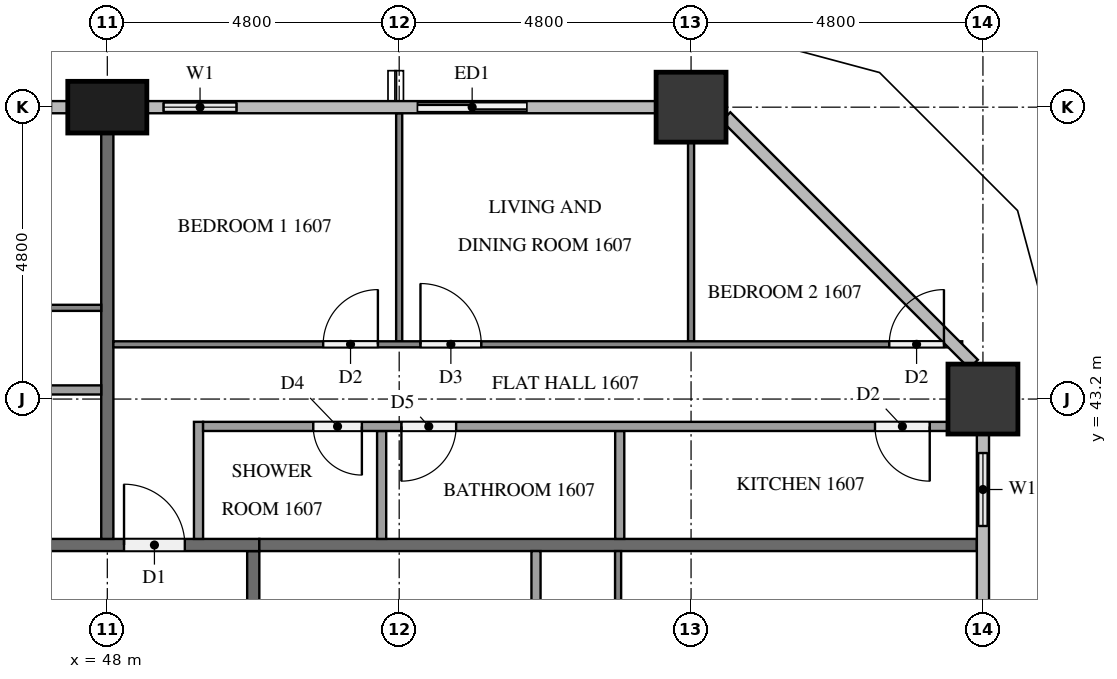
"""IFC4 building model, lengths in metres.
Left out: names, types, materials, properties, quantities, classifications, styles, units other than length and angle.
Written with IfcOpenShell. Run it as: python <this file> out.ifc"""

import sys

from ifc_helpers import new_model, si_unit, direction, frame, frame_2d, origin, origin_2d, place, context, subcontext, project, spatial, rectangle, extrude, element, fill, save


model = new_model("IFC4")
c1 = context("Model", 3, precision=1e-05, world=origin(), true_north=direction((0.0, 1.0)))
c2 = subcontext(c1, "Body", "Model", "MODEL_VIEW")
j1 = project(units=[si_unit("LENGTHUNIT", "METRE"), si_unit("PLANEANGLEUNIT", "RADIAN")], contexts=[c1])
p1 = place(None, origin())
s1 = spatial("IfcSite", under=j1, at=p1, CompositionType="ELEMENT")
p2 = place(p1, origin())
s2 = spatial("IfcBuilding", under=s1, at=p2, CompositionType="ELEMENT")
p3 = place(p2, frame((0.0, 0.0, 66.3)))
s3 = spatial("IfcBuildingStorey", under=s2, at=p3, CompositionType="ELEMENT", Elevation=66.3)
for number, where, z_axis, x_axis in (
    (1, (62.4, 43.2, 0.0), (0.0, 0.0, 1.0), (1.0, 0.0, 0.0)),
    (2, (57.6, 48.0, 0.0), (0.0, 0.0, 1.0), (1.0, 0.0, 0.0)),
):
    element("IfcColumn", number, at=place(p3, frame(where, z_axis=z_axis, x_axis=x_axis)), inside=s3, PredefinedType="COLUMN", context=c2, shape_type="SweptSolid", body=[
        extrude(rectangle(XDim=1.15, YDim=1.15, at=origin_2d()), origin(), (0.0, 0.0, 1.0), 3.2),
    ])
p4 = place(p3, frame((48.0, 48.0, 0.0), z_axis=(0.0, 0.0, 1.0), x_axis=(1.0, 0.0, 0.0)))
e3 = element("IfcColumn", 3, at=p4, inside=s3, PredefinedType="COLUMN", context=c2, shape_type="SweptSolid", body=[
    extrude(rectangle(XDim=1.3, YDim=0.85, at=origin_2d()), origin(), (0.0, 0.0, 1.0), 3.2),
])
p5 = place(p3, frame((62.4, 40.8, 0.0), z_axis=(0.0, 0.0, 1.0), x_axis=(0.0, 1.0, 0.0)))
e4 = element("IfcWall", 4, at=p5, inside=s3, PredefinedType="SOLIDWALL", context=c2, shape_type="SweptSolid", body=[
    extrude(rectangle(XDim=1.825, YDim=0.15, at=frame_2d((0.913, 0.0))), origin(), (0.0, 0.0, 1.0), 3.2),
])
p6 = place(p5, frame((0.312, 0.0, 0.9)))
e5 = element("IfcOpeningElement", 5, at=p6, cuts=e4, PredefinedType="OPENING", context=c2, shape_type="SweptSolid", body=[
    extrude(rectangle(XDim=1.2, YDim=1.4, at=frame_2d((0.6, 0.7))), frame((0.0, 0.085, 0.0), z_axis=(0.0, -1.0, 0.0), x_axis=(1.0, 0.0, 0.0)), (0.0, 0.0, 1.0), 0.17),
])
p7 = place(p3, frame((55.2, 48.0, 0.0), z_axis=(0.0, 0.0, 1.0), x_axis=(-1.0, 0.0, 0.0)))
e6 = element("IfcWall", 6, at=p7, inside=s3, PredefinedType="SOLIDWALL", context=c2, shape_type="SweptSolid", body=[
    extrude(rectangle(XDim=2.4, YDim=0.15, at=frame_2d((1.2, 0.0))), origin(), (0.0, 0.0, 1.0), 3.2),
])
p8 = place(p7, frame((0.3, 0.0, 0.0)))
e7 = element("IfcOpeningElement", 7, at=p8, cuts=e6, PredefinedType="OPENING", context=c2, shape_type="SweptSolid", body=[
    extrude(rectangle(XDim=1.8, YDim=2.4, at=frame_2d((0.9, 1.2))), frame((0.0, 0.085, 0.0), z_axis=(0.0, -1.0, 0.0), x_axis=(1.0, 0.0, 0.0)), (0.0, 0.0, 1.0), 0.17),
])
p9 = place(p3, frame((50.4, 48.0, 0.0), z_axis=(0.0, 0.0, 1.0), x_axis=(-1.0, 0.0, 0.0)))
e8 = element("IfcWall", 8, at=p9, inside=s3, PredefinedType="SOLIDWALL", context=c2, shape_type="SweptSolid", body=[
    extrude(rectangle(XDim=1.75, YDim=0.15, at=frame_2d((0.875, 0.0))), origin(), (0.0, 0.0, 1.0), 3.2),
])
p10 = place(p9, frame((0.275, 0.0, 0.9)))
e9 = element("IfcOpeningElement", 9, at=p10, cuts=e8, PredefinedType="OPENING", context=c2, shape_type="SweptSolid", body=[
    extrude(rectangle(XDim=1.2, YDim=1.4, at=frame_2d((0.6, 0.7))), frame((0.0, 0.085, 0.0), z_axis=(0.0, -1.0, 0.0), x_axis=(1.0, 0.0, 0.0)), (0.0, 0.0, 1.0), 0.17),
])
p11 = place(p3, frame((47.35, 48.0, 0.0), z_axis=(0.0, 0.0, 1.0), x_axis=(-1.0, 0.0, 0.0)))
e10 = element("IfcWall", 10, at=p11, inside=s3, PredefinedType="SOLIDWALL", context=c2, shape_type="SweptSolid", body=[
    extrude(rectangle(XDim=1.75, YDim=0.15, at=frame_2d((0.875, 0.0))), origin(), (0.0, 0.0, 1.0), 3.2),
])
p12 = place(p11, frame((0.275, 0.0, 0.9)))
e11 = element("IfcOpeningElement", 11, at=p12, cuts=e10, PredefinedType="OPENING", context=c2, shape_type="SweptSolid", body=[
    extrude(rectangle(XDim=1.2, YDim=1.4, at=frame_2d((0.6, 0.7))), frame((0.0, 0.085, 0.0), z_axis=(0.0, -1.0, 0.0), x_axis=(1.0, 0.0, 0.0)), (0.0, 0.0, 1.0), 0.17),
])
p13 = place(p3, frame((50.4, 40.7, 0.0), z_axis=(0.0, 0.0, 1.0), x_axis=(0.0, -1.0, 0.0)))
e12 = element("IfcWall", 12, at=p13, inside=s3, PredefinedType="PARTITIONING", context=c2, shape_type="SweptSolid", body=[
    extrude(rectangle(XDim=28.6, YDim=0.2, at=frame_2d((14.3, 0.0))), origin(), (0.0, 0.0, 1.0), 3.2),
])
p14 = place(p13, frame((24.175, 0.0, 0.0)))
e13 = element("IfcOpeningElement", 13, at=p14, cuts=e12, PredefinedType="OPENING", context=c2, shape_type="SweptSolid", body=[
    extrude(rectangle(XDim=1.0, YDim=2.1, at=frame_2d((0.5, 1.05))), frame((0.0, 0.11, 0.0), z_axis=(0.0, -1.0, 0.0), x_axis=(1.0, 0.0, 0.0)), (0.0, 0.0, 1.0), 0.22),
])
p15 = place(p13, frame((22.625, 0.0, 0.0)))
e14 = element("IfcOpeningElement", 14, at=p15, cuts=e12, PredefinedType="OPENING", context=c2, shape_type="SweptSolid", body=[
    extrude(rectangle(XDim=1.0, YDim=2.1, at=frame_2d((0.5, 1.05))), frame((0.0, 0.11, 0.0), z_axis=(0.0, -1.0, 0.0), x_axis=(1.0, 0.0, 0.0)), (0.0, 0.0, 1.0), 0.22),
])
p16 = place(p13, frame((10.625, 0.0, 0.0)))
e15 = element("IfcOpeningElement", 15, at=p16, cuts=e12, PredefinedType="OPENING", context=c2, shape_type="SweptSolid", body=[
    extrude(rectangle(XDim=1.0, YDim=2.1, at=frame_2d((0.5, 1.05))), frame((0.0, 0.11, 0.0), z_axis=(0.0, -1.0, 0.0), x_axis=(1.0, 0.0, 0.0)), (0.0, 0.0, 1.0), 0.22),
])
p17 = place(p3, frame((11.9, 40.8, 0.0), z_axis=(0.0, 0.0, 1.0), x_axis=(1.0, 0.0, 0.0)))
e16 = element("IfcWall", 16, at=p17, inside=s3, PredefinedType="PARTITIONING", context=c2, shape_type="SweptSolid", body=[
    extrude(rectangle(XDim=38.6, YDim=0.2, at=frame_2d((19.3, 0.0))), origin(), (0.0, 0.0, 1.0), 3.2),
])
p18 = place(p17, frame((36.375, 0.0, 0.0)))
e17 = element("IfcOpeningElement", 17, at=p18, cuts=e16, PredefinedType="OPENING", context=c2, shape_type="SweptSolid", body=[
    extrude(rectangle(XDim=1.0, YDim=2.1, at=frame_2d((0.5, 1.05))), frame((0.0, 0.11, 0.0), z_axis=(0.0, -1.0, 0.0), x_axis=(1.0, 0.0, 0.0)), (0.0, 0.0, 1.0), 0.22),
])
p19 = place(p17, frame((17.125, 0.0, 0.0)))
e18 = element("IfcOpeningElement", 18, at=p19, cuts=e16, PredefinedType="OPENING", context=c2, shape_type="SweptSolid", body=[
    extrude(rectangle(XDim=1.1, YDim=2.1, at=frame_2d((0.55, 1.05))), frame((0.0, 0.11, 0.0), z_axis=(0.0, -1.0, 0.0), x_axis=(1.0, 0.0, 0.0)), (0.0, 0.0, 1.0), 0.22),
])
p20 = place(p17, frame((15.625, 0.0, 0.0)))
e19 = element("IfcOpeningElement", 19, at=p20, cuts=e16, PredefinedType="OPENING", context=c2, shape_type="SweptSolid", body=[
    extrude(rectangle(XDim=1.0, YDim=2.1, at=frame_2d((0.5, 1.05))), frame((0.0, 0.11, 0.0), z_axis=(0.0, -1.0, 0.0), x_axis=(1.0, 0.0, 0.0)), (0.0, 0.0, 1.0), 0.22),
])
p21 = place(p17, frame((1.225, 0.0, 0.0)))
e20 = element("IfcOpeningElement", 20, at=p21, cuts=e16, PredefinedType="OPENING", context=c2, shape_type="SweptSolid", body=[
    extrude(rectangle(XDim=1.0, YDim=2.1, at=frame_2d((0.5, 1.05))), frame((0.0, 0.11, 0.0), z_axis=(0.0, -1.0, 0.0), x_axis=(1.0, 0.0, 0.0)), (0.0, 0.0, 1.0), 0.22),
])
p22 = place(p3, frame((50.5, 40.8, 0.0), z_axis=(0.0, 0.0, 1.0), x_axis=(1.0, 0.0, 0.0)))
e21 = element("IfcWall", 21, at=p22, inside=s3, PredefinedType="PARTITIONING", context=c2, shape_type="SweptSolid", body=[
    extrude(rectangle(XDim=11.8, YDim=0.2, at=frame_2d((5.9, 0.0))), origin(), (0.0, 0.0, 1.0), 3.2),
])
p23 = place(p3, frame((48.0, 47.575, 0.0), z_axis=(0.0, 0.0, 1.0), x_axis=(0.0, -1.0, 0.0)))
e22 = element("IfcWall", 22, at=p23, inside=s3, PredefinedType="PARTITIONING", context=c2, shape_type="SweptSolid", body=[
    extrude(rectangle(XDim=6.675, YDim=0.2, at=frame_2d((3.337, 0.0))), origin(), (0.0, 0.0, 1.0), 3.2),
])
p24 = place(p3, frame((56.4, 40.7, 0.0), z_axis=(0.0, 0.0, 1.0), x_axis=(0.0, -1.0, 0.0)))
e23 = element("IfcWall", 23, at=p24, inside=s3, PredefinedType="PARTITIONING", context=c2, shape_type="SweptSolid", body=[
    extrude(rectangle(XDim=11.8, YDim=0.1, at=frame_2d((5.9, 0.0))), origin(), (0.0, 0.0, 1.0), 3.2),
])
p25 = place(p24, frame((5.05, 0.0, 0.0)))
e24 = element("IfcOpeningElement", 24, at=p25, cuts=e23, PredefinedType="OPENING", context=c2, shape_type="SweptSolid", body=[
    extrude(rectangle(XDim=1.0, YDim=2.1, at=frame_2d((0.5, 1.05))), frame((0.0, 0.06, 0.0), z_axis=(0.0, -1.0, 0.0), x_axis=(1.0, 0.0, 0.0)), (0.0, 0.0, 1.0), 0.12),
])
p26 = place(p24, frame((3.45, 0.0, 0.0)))
e25 = element("IfcOpeningElement", 25, at=p26, cuts=e23, PredefinedType="OPENING", context=c2, shape_type="SweptSolid", body=[
    extrude(rectangle(XDim=0.9, YDim=2.1, at=frame_2d((0.45, 1.05))), frame((0.0, 0.06, 0.0), z_axis=(0.0, -1.0, 0.0), x_axis=(1.0, 0.0, 0.0)), (0.0, 0.0, 1.0), 0.12),
])
p27 = place(p3, frame((55.05, 30.375, 0.0), z_axis=(0.0, 0.0, 1.0), x_axis=(0.0, 1.0, 0.0)))
e26 = element("IfcWall", 26, at=p27, inside=s3, PredefinedType="PARTITIONING", context=c2, shape_type="SweptSolid", body=[
    extrude(rectangle(XDim=10.325, YDim=0.15, at=frame_2d((5.163, 0.0))), origin(), (0.0, 0.0, 1.0), 3.2),
])
p28 = place(p27, frame((3.005, 0.0, 0.0)))
e27 = element("IfcOpeningElement", 27, at=p28, cuts=e26, PredefinedType="OPENING", context=c2, shape_type="SweptSolid", body=[
    extrude(rectangle(XDim=0.8, YDim=2.1, at=frame_2d((0.4, 1.05))), frame((0.0, 0.085, 0.0), z_axis=(0.0, -1.0, 0.0), x_axis=(1.0, 0.0, 0.0)), (0.0, 0.0, 1.0), 0.17),
])
p29 = place(p27, frame((4.455, 0.0, 0.0)))
e28 = element("IfcOpeningElement", 28, at=p29, cuts=e26, PredefinedType="OPENING", context=c2, shape_type="SweptSolid", body=[
    extrude(rectangle(XDim=0.9, YDim=2.1, at=frame_2d((0.45, 1.05))), frame((0.0, 0.085, 0.0), z_axis=(0.0, -1.0, 0.0), x_axis=(1.0, 0.0, 0.0)), (0.0, 0.0, 1.0), 0.17),
])
p30 = place(p3, frame((52.8, 44.15, 0.0), z_axis=(0.0, 0.0, 1.0), x_axis=(0.0, 1.0, 0.0)))
e29 = element("IfcWall", 29, at=p30, inside=s3, PredefinedType="PARTITIONING", context=c2, shape_type="SweptSolid", body=[
    extrude(rectangle(XDim=3.75, YDim=0.1, at=frame_2d((1.875, 0.0))), origin(), (0.0, 0.0, 1.0), 3.2),
])
p31 = place(p3, frame((57.6, 44.15, 0.0), z_axis=(0.0, 0.0, 1.0), x_axis=(0.0, 1.0, 0.0)))
e30 = element("IfcWall", 30, at=p31, inside=s3, PredefinedType="PARTITIONING", context=c2, shape_type="SweptSolid", body=[
    extrude(rectangle(XDim=3.275, YDim=0.1, at=frame_2d((1.638, 0.0))), origin(), (0.0, 0.0, 1.0), 3.2),
])
p32 = place(p3, frame((48.1, 44.1, 0.0), z_axis=(0.0, 0.0, 1.0), x_axis=(1.0, 0.0, 0.0)))
e31 = element("IfcWall", 31, at=p32, inside=s3, PredefinedType="PARTITIONING", context=c2, shape_type="SweptSolid", body=[
    extrude(rectangle(XDim=13.959, YDim=0.1, at=frame_2d((6.979, 0.0))), origin(), (0.0, 0.0, 1.0), 3.2),
])
p33 = place(p32, frame((3.45, 0.0, 0.0)))
e32 = element("IfcOpeningElement", 32, at=p33, cuts=e31, PredefinedType="OPENING", context=c2, shape_type="SweptSolid", body=[
    extrude(rectangle(XDim=0.9, YDim=2.1, at=frame_2d((0.45, 1.05))), frame((0.0, 0.06, 0.0), z_axis=(0.0, -1.0, 0.0), x_axis=(1.0, 0.0, 0.0)), (0.0, 0.0, 1.0), 0.12),
])
p34 = place(p32, frame((5.05, 0.0, 0.0)))
e33 = element("IfcOpeningElement", 33, at=p34, cuts=e31, PredefinedType="OPENING", context=c2, shape_type="SweptSolid", body=[
    extrude(rectangle(XDim=1.0, YDim=2.1, at=frame_2d((0.5, 1.05))), frame((0.0, 0.06, 0.0), z_axis=(0.0, -1.0, 0.0), x_axis=(1.0, 0.0, 0.0)), (0.0, 0.0, 1.0), 0.12),
])
p35 = place(p32, frame((12.759, 0.0, 0.0)))
e34 = element("IfcOpeningElement", 34, at=p35, cuts=e31, PredefinedType="OPENING", context=c2, shape_type="SweptSolid", body=[
    extrude(rectangle(XDim=0.9, YDim=2.1, at=frame_2d((0.45, 1.05))), frame((0.0, 0.06, 0.0), z_axis=(0.0, -1.0, 0.0), x_axis=(1.0, 0.0, 0.0)), (0.0, 0.0, 1.0), 0.12),
])
for number, where, z_axis, x_axis in (
    (35, (52.511, 40.9, 0.0), (0.0, 0.0, 1.0), (0.0, 1.0, 0.0)),
    (36, (56.427, 40.9, 0.0), (0.0, 0.0, 1.0), (0.0, 1.0, 0.0)),
):
    element("IfcWall", number, at=place(p3, frame(where, z_axis=z_axis, x_axis=x_axis)), inside=s3, PredefinedType="PARTITIONING", context=c2, shape_type="SweptSolid", body=[
        extrude(rectangle(XDim=1.775, YDim=0.15, at=frame_2d((0.888, 0.0))), origin(), (0.0, 0.0, 1.0), 3.2),
    ])
p36 = place(p3, frame((49.5, 40.9, 0.0), z_axis=(0.0, 0.0, 1.0), x_axis=(0.0, 1.0, 0.0)))
e37 = element("IfcWall", 37, at=p36, inside=s3, PredefinedType="PARTITIONING", context=c2, shape_type="SweptSolid", body=[
    extrude(rectangle(XDim=1.925, YDim=0.15, at=frame_2d((0.962, 0.0))), origin(), (0.0, 0.0, 1.0), 3.2),
])
p37 = place(p3, frame((61.825, 42.75, 0.0), z_axis=(0.0, 0.0, 1.0), x_axis=(-1.0, 0.0, 0.0)))
e38 = element("IfcWall", 38, at=p37, inside=s3, PredefinedType="PARTITIONING", context=c2, shape_type="SweptSolid", body=[
    extrude(rectangle(XDim=12.25, YDim=0.15, at=frame_2d((6.125, 0.0))), origin(), (0.0, 0.0, 1.0), 3.2),
])
p38 = place(p37, frame((9.638, 0.0, 0.0)))
e39 = element("IfcOpeningElement", 39, at=p38, cuts=e38, PredefinedType="OPENING", context=c2, shape_type="SweptSolid", body=[
    extrude(rectangle(XDim=0.8, YDim=2.1, at=frame_2d((0.4, 1.05))), frame((0.0, 0.085, 0.0), z_axis=(0.0, -1.0, 0.0), x_axis=(1.0, 0.0, 0.0)), (0.0, 0.0, 1.0), 0.17),
])
p39 = place(p37, frame((8.088, 0.0, 0.0)))
e40 = element("IfcOpeningElement", 40, at=p39, cuts=e38, PredefinedType="OPENING", context=c2, shape_type="SweptSolid", body=[
    extrude(rectangle(XDim=0.9, YDim=2.1, at=frame_2d((0.45, 1.05))), frame((0.0, 0.085, 0.0), z_axis=(0.0, -1.0, 0.0), x_axis=(1.0, 0.0, 0.0)), (0.0, 0.0, 1.0), 0.17),
])
p40 = place(p37, frame((0.3, 0.0, 0.0)))
e41 = element("IfcOpeningElement", 41, at=p40, cuts=e38, PredefinedType="OPENING", context=c2, shape_type="SweptSolid", body=[
    extrude(rectangle(XDim=0.9, YDim=2.1, at=frame_2d((0.45, 1.05))), frame((0.0, 0.085, 0.0), z_axis=(0.0, -1.0, 0.0), x_axis=(1.0, 0.0, 0.0)), (0.0, 0.0, 1.0), 0.17),
])
p41 = place(p3, frame((28.9, 44.7, 0.0), z_axis=(0.0, 0.0, 1.0), x_axis=(1.0, 0.0, 0.0)))
e42 = element("IfcWall", 42, at=p41, inside=s3, PredefinedType="PARTITIONING", context=c2, shape_type="SweptSolid", body=[
    extrude(rectangle(XDim=19.0, YDim=0.1, at=frame_2d((9.5, 0.0))), origin(), (0.0, 0.0, 1.0), 3.2),
])
p42 = place(p41, frame((3.35, 0.0, 0.0)))
e43 = element("IfcOpeningElement", 43, at=p42, cuts=e42, PredefinedType="OPENING", context=c2, shape_type="SweptSolid", body=[
    extrude(rectangle(XDim=1.0, YDim=2.1, at=frame_2d((0.5, 1.05))), frame((0.0, 0.06, 0.0), z_axis=(0.0, -1.0, 0.0), x_axis=(1.0, 0.0, 0.0)), (0.0, 0.0, 1.0), 0.12),
])
p43 = place(p41, frame((5.05, 0.0, 0.0)))
e44 = element("IfcOpeningElement", 44, at=p43, cuts=e42, PredefinedType="OPENING", context=c2, shape_type="SweptSolid", body=[
    extrude(rectangle(XDim=0.9, YDim=2.1, at=frame_2d((0.45, 1.05))), frame((0.0, 0.06, 0.0), z_axis=(0.0, -1.0, 0.0), x_axis=(1.0, 0.0, 0.0)), (0.0, 0.0, 1.0), 0.12),
])
p44 = place(p41, frame((13.05, 0.0, 0.0)))
e45 = element("IfcOpeningElement", 45, at=p44, cuts=e42, PredefinedType="OPENING", context=c2, shape_type="SweptSolid", body=[
    extrude(rectangle(XDim=0.9, YDim=2.1, at=frame_2d((0.45, 1.05))), frame((0.0, 0.06, 0.0), z_axis=(0.0, -1.0, 0.0), x_axis=(1.0, 0.0, 0.0)), (0.0, 0.0, 1.0), 0.12),
])
p45 = place(p41, frame((14.65, 0.0, 0.0)))
e46 = element("IfcOpeningElement", 46, at=p45, cuts=e42, PredefinedType="OPENING", context=c2, shape_type="SweptSolid", body=[
    extrude(rectangle(XDim=0.9, YDim=2.1, at=frame_2d((0.45, 1.05))), frame((0.0, 0.06, 0.0), z_axis=(0.0, -1.0, 0.0), x_axis=(1.0, 0.0, 0.0)), (0.0, 0.0, 1.0), 0.12),
])
p46 = place(p3, frame((47.9, 43.35, 0.0), z_axis=(0.0, 0.0, 1.0), x_axis=(-1.0, 0.0, 0.0)))
e47 = element("IfcWall", 47, at=p46, inside=s3, PredefinedType="PARTITIONING", context=c2, shape_type="SweptSolid", body=[
    extrude(rectangle(XDim=17.525, YDim=0.15, at=frame_2d((8.762, 0.0))), origin(), (0.0, 0.0, 1.0), 3.2),
])
p47 = place(p46, frame((14.564, 0.0, 0.0)))
e48 = element("IfcOpeningElement", 48, at=p47, cuts=e47, PredefinedType="OPENING", context=c2, shape_type="SweptSolid", body=[
    extrude(rectangle(XDim=0.8, YDim=2.1, at=frame_2d((0.4, 1.05))), frame((0.0, 0.085, 0.0), z_axis=(0.0, -1.0, 0.0), x_axis=(1.0, 0.0, 0.0)), (0.0, 0.0, 1.0), 0.17),
])
p48 = place(p46, frame((13.114, 0.0, 0.0)))
e49 = element("IfcOpeningElement", 49, at=p48, cuts=e47, PredefinedType="OPENING", context=c2, shape_type="SweptSolid", body=[
    extrude(rectangle(XDim=0.8, YDim=2.1, at=frame_2d((0.4, 1.05))), frame((0.0, 0.085, 0.0), z_axis=(0.0, -1.0, 0.0), x_axis=(1.0, 0.0, 0.0)), (0.0, 0.0, 1.0), 0.17),
])
p49 = place(p46, frame((4.706, 0.0, 0.0)))
e50 = element("IfcOpeningElement", 50, at=p49, cuts=e47, PredefinedType="OPENING", context=c2, shape_type="SweptSolid", body=[
    extrude(rectangle(XDim=0.9, YDim=2.1, at=frame_2d((0.45, 1.05))), frame((0.0, 0.085, 0.0), z_axis=(0.0, -1.0, 0.0), x_axis=(1.0, 0.0, 0.0)), (0.0, 0.0, 1.0), 0.17),
])
p50 = place(p46, frame((3.156, 0.0, 0.0)))
e51 = element("IfcOpeningElement", 51, at=p50, cuts=e47, PredefinedType="OPENING", context=c2, shape_type="SweptSolid", body=[
    extrude(rectangle(XDim=0.9, YDim=2.1, at=frame_2d((0.45, 1.05))), frame((0.0, 0.085, 0.0), z_axis=(0.0, -1.0, 0.0), x_axis=(1.0, 0.0, 0.0)), (0.0, 0.0, 1.0), 0.17),
])
p51 = place(p6, origin())
e52 = element("IfcWindow", 52, at=p51, inside=s3, PartitioningType="SINGLE_PANEL", PredefinedType="WINDOW", context=c2, shape_type="SweptSolid", body=[
    extrude(rectangle(XDim=1.2, YDim=1.4, at=frame_2d((0.6, 0.7))), frame((0.0, 0.03, 0.0), z_axis=(0.0, -1.0, 0.0), x_axis=(1.0, 0.0, 0.0)), (0.0, 0.0, 1.0), 0.06),
])
fill(e5, e52)
p52 = place(p8, origin())
e53 = element("IfcDoor", 53, at=p52, inside=s3, OperationType="SLIDING_TO_RIGHT", PredefinedType="DOOR", context=c2, shape_type="SweptSolid", body=[
    extrude(rectangle(XDim=1.8, YDim=2.4, at=frame_2d((0.9, 1.2))), frame((0.0, 0.025, 0.0), z_axis=(0.0, -1.0, 0.0), x_axis=(1.0, 0.0, 0.0)), (0.0, 0.0, 1.0), 0.05),
])
fill(e7, e53)
p53 = place(p10, origin())
e54 = element("IfcWindow", 54, at=p53, inside=s3, PartitioningType="SINGLE_PANEL", PredefinedType="WINDOW", context=c2, shape_type="SweptSolid", body=[
    extrude(rectangle(XDim=1.2, YDim=1.4, at=frame_2d((0.6, 0.7))), frame((0.0, 0.03, 0.0), z_axis=(0.0, -1.0, 0.0), x_axis=(1.0, 0.0, 0.0)), (0.0, 0.0, 1.0), 0.06),
])
fill(e9, e54)
p54 = place(p18, origin())
e55 = element("IfcDoor", 55, at=p54, inside=s3, OperationType="SINGLE_SWING_LEFT", PredefinedType="DOOR", context=c2, shape_type="SweptSolid", body=[
    extrude(rectangle(XDim=1.0, YDim=2.1, at=frame_2d((0.5, 1.05))), frame((0.0, 0.025, 0.0), z_axis=(0.0, -1.0, 0.0), x_axis=(1.0, 0.0, 0.0)), (0.0, 0.0, 1.0), 0.05),
])
fill(e17, e55)
p55 = place(p33, origin())
e56 = element("IfcDoor", 56, at=p55, inside=s3, OperationType="SINGLE_SWING_RIGHT", PredefinedType="DOOR", context=c2, shape_type="SweptSolid", body=[
    extrude(rectangle(XDim=0.9, YDim=2.1, at=frame_2d((0.45, 1.05))), frame((0.0, 0.025, 0.0), z_axis=(0.0, -1.0, 0.0), x_axis=(1.0, 0.0, 0.0)), (0.0, 0.0, 1.0), 0.05),
])
fill(e32, e56)
p56 = place(p34, origin())
e57 = element("IfcDoor", 57, at=p56, inside=s3, OperationType="SINGLE_SWING_LEFT", PredefinedType="DOOR", context=c2, shape_type="SweptSolid", body=[
    extrude(rectangle(XDim=1.0, YDim=2.1, at=frame_2d((0.5, 1.05))), frame((0.0, 0.025, 0.0), z_axis=(0.0, -1.0, 0.0), x_axis=(1.0, 0.0, 0.0)), (0.0, 0.0, 1.0), 0.05),
])
fill(e33, e57)
p57 = place(p35, origin())
e58 = element("IfcDoor", 58, at=p57, inside=s3, OperationType="SINGLE_SWING_RIGHT", PredefinedType="DOOR", context=c2, shape_type="SweptSolid", body=[
    extrude(rectangle(XDim=0.9, YDim=2.1, at=frame_2d((0.45, 1.05))), frame((0.0, 0.025, 0.0), z_axis=(0.0, -1.0, 0.0), x_axis=(1.0, 0.0, 0.0)), (0.0, 0.0, 1.0), 0.05),
])
fill(e34, e58)
p58 = place(p38, origin())
e59 = element("IfcDoor", 59, at=p58, inside=s3, OperationType="SINGLE_SWING_LEFT", PredefinedType="DOOR", context=c2, shape_type="SweptSolid", body=[
    extrude(rectangle(XDim=0.8, YDim=2.1, at=frame_2d((0.4, 1.05))), frame((0.0, 0.025, 0.0), z_axis=(0.0, -1.0, 0.0), x_axis=(1.0, 0.0, 0.0)), (0.0, 0.0, 1.0), 0.05),
])
fill(e39, e59)
p59 = place(p39, origin())
e60 = element("IfcDoor", 60, at=p59, inside=s3, OperationType="SINGLE_SWING_RIGHT", PredefinedType="DOOR", context=c2, shape_type="SweptSolid", body=[
    extrude(rectangle(XDim=0.9, YDim=2.1, at=frame_2d((0.45, 1.05))), frame((0.0, 0.025, 0.0), z_axis=(0.0, -1.0, 0.0), x_axis=(1.0, 0.0, 0.0)), (0.0, 0.0, 1.0), 0.05),
])
fill(e40, e60)
p60 = place(p40, origin())
e61 = element("IfcDoor", 61, at=p60, inside=s3, OperationType="SINGLE_SWING_LEFT", PredefinedType="DOOR", context=c2, shape_type="SweptSolid", body=[
    extrude(rectangle(XDim=0.9, YDim=2.1, at=frame_2d((0.45, 1.05))), frame((0.0, 0.025, 0.0), z_axis=(0.0, -1.0, 0.0), x_axis=(1.0, 0.0, 0.0)), (0.0, 0.0, 1.0), 0.05),
])
fill(e41, e61)
save(model, sys.argv[1])
